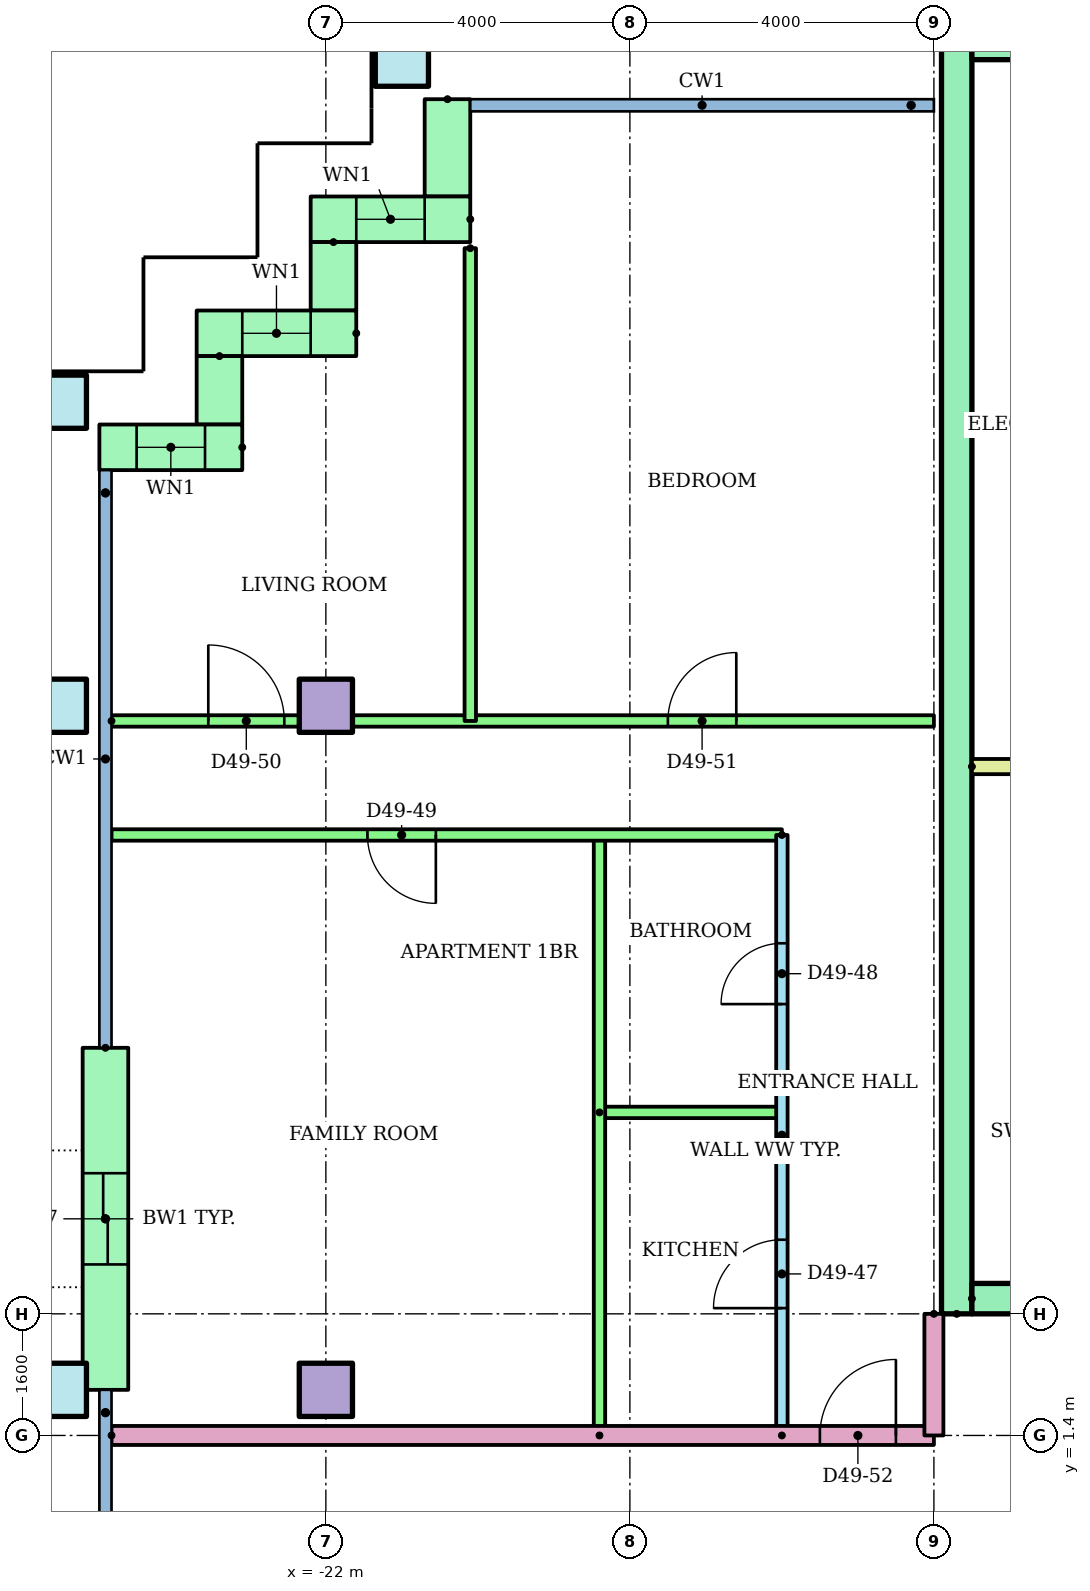
"""IFC4 building model, lengths in metres.
Left out: names, types, materials, properties, quantities, classifications, styles, units other than length and angle.
Written with IfcOpenShell. Run it as: python <this file> out.ifc"""

import sys

from ifc_helpers import new_model, si_unit, direction, frame, frame_2d, origin, origin_2d, place, context, subcontext, project, spatial, rectangle, hollow_rectangle, extrude, element, fill, save


model = new_model("IFC4")
c1 = context("Model", 3, precision=1e-05, world=origin(), true_north=direction((0.0, 1.0)))
c2 = subcontext(c1, "Body", "Model", "MODEL_VIEW")
j1 = project(units=[si_unit("LENGTHUNIT", "METRE"), si_unit("PLANEANGLEUNIT", "RADIAN")], contexts=[c1])
p1 = place(None, origin())
s1 = spatial("IfcSite", under=j1, at=p1, CompositionType="ELEMENT")
p2 = place(p1, origin())
s2 = spatial("IfcBuilding", under=s1, at=p2, CompositionType="ELEMENT")
p3 = place(p2, frame((0.0, 0.0, 187.7)))
s3 = spatial("IfcBuildingStorey", under=s2, at=p3, CompositionType="ELEMENT", Elevation=187.7)
p4 = place(p3, frame((-25.5, 2.0, 0.0)))
e1 = element("IfcColumn", 1, at=p4, inside=s3, PredefinedType="COLUMN", context=c2, shape_type="SweptSolid", body=[
    extrude(hollow_rectangle(XDim=0.7, YDim=0.7, WallThickness=0.036, at=origin_2d()), origin(), (0.0, 0.0, 1.0), 3.2),
])
p5 = place(p3, frame((-22.0, 2.0, 0.0)))
e2 = element("IfcColumn", 2, at=p5, inside=s3, PredefinedType="COLUMN", context=c2, shape_type="SweptSolid", body=[
    extrude(rectangle(XDim=0.7, YDim=0.7, at=origin_2d()), origin(), (0.0, 0.0, 1.0), 3.2),
])
p6 = place(p3, frame((-25.5, 11.0, 0.0)))
e3 = element("IfcColumn", 3, at=p6, inside=s3, PredefinedType="COLUMN", context=c2, shape_type="SweptSolid", body=[
    extrude(hollow_rectangle(XDim=0.7, YDim=0.7, WallThickness=0.036, at=origin_2d()), origin(), (0.0, 0.0, 1.0), 3.2),
])
p7 = place(p3, frame((-22.0, 11.0, 0.0)))
e4 = element("IfcColumn", 4, at=p7, inside=s3, PredefinedType="COLUMN", context=c2, shape_type="SweptSolid", body=[
    extrude(rectangle(XDim=0.7, YDim=0.7, at=origin_2d()), origin(), (0.0, 0.0, 1.0), 3.2),
])
for number, where in (
    (5, (-25.5, 15.0, 0.0)),
    (6, (-21.0, 19.5, 0.0)),
):
    element("IfcColumn", number, at=place(p3, frame(where)), inside=s3, PredefinedType="COLUMN", context=c2, shape_type="SweptSolid", body=[
        extrude(hollow_rectangle(XDim=0.7, YDim=0.7, WallThickness=0.036, at=origin_2d()), origin(), (0.0, 0.0, 1.0), 3.2),
    ])
p8 = place(p3, frame((-20.4, 18.98, 0.0), z_axis=(0.0, 0.0, 1.0), x_axis=(0.0, -1.0, 0.0)))
e7 = element("IfcWall", 7, at=p8, inside=s3, PredefinedType="STANDARD", context=c2, shape_type="SweptSolid", body=[
    extrude(rectangle(XDim=1.28, YDim=0.6, at=frame_2d((0.64, 0.0))), origin(), (0.0, 0.0, 1.0), 2.92),
])
p9 = place(p3, frame((-20.1, 17.4, 0.0), z_axis=(0.0, 0.0, 1.0), x_axis=(-1.0, 0.0, 0.0)))
e8 = element("IfcWall", 8, at=p9, inside=s3, PredefinedType="STANDARD", context=c2, shape_type="SweptSolid", body=[
    extrude(rectangle(XDim=2.1, YDim=0.6, at=frame_2d((1.05, 0.0))), origin(), (0.0, 0.0, 1.0), 2.92),
])
p10 = place(p9, frame((0.6, 0.0, 0.9)))
e9 = element("IfcOpeningElement", 9, at=p10, cuts=e8, PredefinedType="OPENING", context=c2, shape_type="SweptSolid", body=[
    extrude(rectangle(XDim=0.9, YDim=1.5, at=frame_2d((0.45, 0.75))), frame((0.0, 0.31, 0.0), z_axis=(0.0, -1.0, 0.0), x_axis=(1.0, 0.0, 0.0)), (0.0, 0.0, 1.0), 0.62),
])
p11 = place(p3, frame((-21.9, 17.1, 0.0), z_axis=(0.0, 0.0, 1.0), x_axis=(0.0, -1.0, 0.0)))
e10 = element("IfcWall", 10, at=p11, inside=s3, PredefinedType="STANDARD", context=c2, shape_type="SweptSolid", body=[
    extrude(rectangle(XDim=0.9, YDim=0.6, at=frame_2d((0.45, 0.0))), origin(), (0.0, 0.0, 1.0), 2.92),
])
p12 = place(p3, frame((-21.6, 15.9, 0.0), z_axis=(0.0, 0.0, 1.0), x_axis=(-1.0, 0.0, 0.0)))
e11 = element("IfcWall", 11, at=p12, inside=s3, PredefinedType="STANDARD", context=c2, shape_type="SweptSolid", body=[
    extrude(rectangle(XDim=2.1, YDim=0.6, at=frame_2d((1.05, 0.0))), origin(), (0.0, 0.0, 1.0), 2.92),
])
p13 = place(p12, frame((0.6, 0.0, 0.9)))
e12 = element("IfcOpeningElement", 12, at=p13, cuts=e11, PredefinedType="OPENING", context=c2, shape_type="SweptSolid", body=[
    extrude(rectangle(XDim=0.9, YDim=1.5, at=frame_2d((0.45, 0.75))), frame((0.0, 0.31, 0.0), z_axis=(0.0, -1.0, 0.0), x_axis=(1.0, 0.0, 0.0)), (0.0, 0.0, 1.0), 0.62),
])
p14 = place(p3, frame((-23.4, 15.6, 0.0), z_axis=(0.0, 0.0, 1.0), x_axis=(0.0, -1.0, 0.0)))
e13 = element("IfcWall", 13, at=p14, inside=s3, PredefinedType="STANDARD", context=c2, shape_type="SweptSolid", body=[
    extrude(rectangle(XDim=0.9, YDim=0.6, at=frame_2d((0.45, 0.0))), origin(), (0.0, 0.0, 1.0), 2.92),
])
p15 = place(p3, frame((-23.1, 14.4, 0.0), z_axis=(0.0, 0.0, 1.0), x_axis=(-1.0, 0.0, 0.0)))
e14 = element("IfcWall", 14, at=p15, inside=s3, PredefinedType="STANDARD", context=c2, shape_type="SweptSolid", body=[
    extrude(rectangle(XDim=1.88, YDim=0.6, at=frame_2d((0.94, 0.0))), origin(), (0.0, 0.0, 1.0), 2.92),
])
p16 = place(p15, frame((0.49, 0.0, 0.9)))
e15 = element("IfcOpeningElement", 15, at=p16, cuts=e14, PredefinedType="OPENING", context=c2, shape_type="SweptSolid", body=[
    extrude(rectangle(XDim=0.9, YDim=1.5, at=frame_2d((0.45, 0.75))), frame((0.0, 0.31, 0.0), z_axis=(0.0, -1.0, 0.0), x_axis=(1.0, 0.0, 0.0)), (0.0, 0.0, 1.0), 0.62),
])
p17 = place(p3, frame((-24.9, 6.5, 0.0), z_axis=(0.0, 0.0, 1.0), x_axis=(0.0, -1.0, 0.0)))
e16 = element("IfcWall", 16, at=p17, inside=s3, PredefinedType="STANDARD", context=c2, shape_type="SweptSolid", body=[
    extrude(rectangle(XDim=4.5, YDim=0.6, at=frame_2d((2.25, 0.0))), origin(), (0.0, 0.0, 1.0), 2.92),
])
p18 = place(p17, frame((1.65, 0.0, 0.0)))
e17 = element("IfcOpeningElement", 17, at=p18, cuts=e16, PredefinedType="OPENING", context=c2, shape_type="SweptSolid", body=[
    extrude(rectangle(XDim=1.2, YDim=2.1, at=frame_2d((0.6, 1.05))), frame((0.0, 0.31, 0.0), z_axis=(0.0, -1.0, 0.0), x_axis=(1.0, 0.0, 0.0)), (0.0, 0.0, 1.0), 0.62),
])
p19 = place(p3, frame((-13.7, 3.0, 0.0), z_axis=(0.0, 0.0, 1.0), x_axis=(0.0, 1.0, 0.0)))
e18 = element("IfcWall", 18, at=p19, inside=s3, PredefinedType="SHEAR", context=c2, shape_type="SweptSolid", body=[
    extrude(rectangle(XDim=17.0, YDim=0.4, at=frame_2d((8.5, 0.0))), origin(), (0.0, 0.0, 1.0), 2.92),
])
p20 = place(p3, frame((-13.5, 19.7, 0.0)))
e19 = element("IfcWall", 19, at=p20, inside=s3, PredefinedType="SHEAR", context=c2, shape_type="SweptSolid", body=[
    extrude(rectangle(XDim=27.0, YDim=0.4, at=frame_2d((13.5, 0.0))), origin(), (0.0, 0.0, 1.0), 2.92),
])
p21 = place(p3, frame((-13.5, 3.2, 0.0)))
e20 = element("IfcWall", 20, at=p21, inside=s3, PredefinedType="SHEAR", context=c2, shape_type="SweptSolid", body=[
    extrude(rectangle(XDim=27.0, YDim=0.4, at=frame_2d((13.5, 0.0))), origin(), (0.0, 0.0, 1.0), 2.92),
])
p22 = place(p21, frame((22.083, 0.0, 0.0)))
e21 = element("IfcOpeningElement", 21, at=p22, cuts=e20, PredefinedType="OPENING", context=c2, shape_type="SweptSolid", body=[
    extrude(rectangle(XDim=1.1, YDim=2.1, at=frame_2d((0.55, 1.05))), frame((0.0, 0.21, 0.0), z_axis=(0.0, -1.0, 0.0), x_axis=(1.0, 0.0, 0.0)), (0.0, 0.0, 1.0), 0.42),
])
p23 = place(p21, frame((25.128, 0.0, 0.0)))
e22 = element("IfcOpeningElement", 22, at=p23, cuts=e20, PredefinedType="OPENING", context=c2, shape_type="SweptSolid", body=[
    extrude(rectangle(XDim=1.1, YDim=2.1, at=frame_2d((0.55, 1.05))), frame((0.0, 0.21, 0.0), z_axis=(0.0, -1.0, 0.0), x_axis=(1.0, 0.0, 0.0)), (0.0, 0.0, 1.0), 0.42),
])
p24 = place(p21, frame((12.6, 0.0, 0.0)))
e23 = element("IfcOpeningElement", 23, at=p24, cuts=e20, PredefinedType="OPENING", context=c2, shape_type="SweptSolid", body=[
    extrude(rectangle(XDim=1.8, YDim=2.1, at=frame_2d((0.9, 1.05))), frame((0.0, 0.21, 0.0), z_axis=(0.0, -1.0, 0.0), x_axis=(1.0, 0.0, 0.0)), (0.0, 0.0, 1.0), 0.42),
])
p25 = place(p3, frame((-13.5, 10.2, 0.0)))
e24 = element("IfcWall", 24, at=p25, inside=s3, PredefinedType="PARTITIONING", context=c2, shape_type="SweptSolid", body=[
    extrude(rectangle(XDim=3.9, YDim=0.2, at=frame_2d((1.95, 0.0))), origin(), (0.0, 0.0, 1.0), 2.92),
])
p26 = place(p3, frame((-16.0, 1.4, 0.0), z_axis=(0.0, 0.0, 1.0), x_axis=(0.0, 1.0, 0.0)))
e25 = element("IfcWall", 25, at=p26, inside=s3, PredefinedType="PARTITIONING", context=c2, shape_type="SweptSolid", body=[
    extrude(rectangle(XDim=7.9, YDim=0.15, at=frame_2d((3.95, 0.0))), origin(), (0.0, 0.0, 1.0), 2.4),
])
p27 = place(p26, frame((1.675, 0.0, 0.0)))
e26 = element("IfcOpeningElement", 26, at=p27, cuts=e25, PredefinedType="OPENING", context=c2, shape_type="SweptSolid", body=[
    extrude(rectangle(XDim=0.9, YDim=2.1, at=frame_2d((0.45, 1.05))), frame((0.0, 0.085, 0.0), z_axis=(0.0, -1.0, 0.0), x_axis=(1.0, 0.0, 0.0)), (0.0, 0.0, 1.0), 0.17),
])
p28 = place(p26, frame((5.675, 0.0, 0.0)))
e27 = element("IfcOpeningElement", 27, at=p28, cuts=e25, PredefinedType="OPENING", context=c2, shape_type="SweptSolid", body=[
    extrude(rectangle(XDim=0.8, YDim=2.1, at=frame_2d((0.4, 1.05))), frame((0.0, 0.085, 0.0), z_axis=(0.0, -1.0, 0.0), x_axis=(1.0, 0.0, 0.0)), (0.0, 0.0, 1.0), 0.17),
])
p29 = place(p3, frame((-18.4, 5.65, 0.0)))
e28 = element("IfcWall", 28, at=p29, inside=s3, PredefinedType="PARTITIONING", context=c2, shape_type="SweptSolid", body=[
    extrude(rectangle(XDim=2.4, YDim=0.15, at=frame_2d((1.2, 0.0))), origin(), (0.0, 0.0, 1.0), 2.4),
])
p30 = place(p3, frame((-18.4, 1.4, 0.0), z_axis=(0.0, 0.0, 1.0), x_axis=(0.0, 1.0, 0.0)))
e29 = element("IfcWall", 29, at=p30, inside=s3, PredefinedType="PARTITIONING", context=c2, shape_type="SweptSolid", body=[
    extrude(rectangle(XDim=7.9, YDim=0.15, at=frame_2d((3.95, 0.0))), origin(), (0.0, 0.0, 1.0), 2.4),
])
p31 = place(p3, frame((-16.0, 9.3, 0.0), z_axis=(0.0, 0.0, 1.0), x_axis=(-1.0, 0.0, 0.0)))
e30 = element("IfcWall", 30, at=p31, inside=s3, PredefinedType="PARTITIONING", context=c2, shape_type="SweptSolid", body=[
    extrude(rectangle(XDim=8.82, YDim=0.15, at=frame_2d((4.41, 0.0))), origin(), (0.0, 0.0, 1.0), 2.4),
])
p32 = place(p31, frame((4.553, 0.0, 0.0)))
e31 = element("IfcOpeningElement", 31, at=p32, cuts=e30, PredefinedType="OPENING", context=c2, shape_type="SweptSolid", body=[
    extrude(rectangle(XDim=0.9, YDim=2.1, at=frame_2d((0.45, 1.05))), frame((0.0, 0.085, 0.0), z_axis=(0.0, -1.0, 0.0), x_axis=(1.0, 0.0, 0.0)), (0.0, 0.0, 1.0), 0.17),
])
p33 = place(p3, frame((-24.82, 10.8, 0.0)))
e32 = element("IfcWall", 32, at=p33, inside=s3, PredefinedType="PARTITIONING", context=c2, shape_type="SweptSolid", body=[
    extrude(rectangle(XDim=10.82, YDim=0.15, at=frame_2d((5.41, 0.0))), origin(), (0.0, 0.0, 1.0), 2.4),
])
p34 = place(p33, frame((1.273, 0.0, 0.0)))
e33 = element("IfcOpeningElement", 33, at=p34, cuts=e32, PredefinedType="OPENING", context=c2, shape_type="SweptSolid", body=[
    extrude(rectangle(XDim=1.0, YDim=2.1, at=frame_2d((0.5, 1.05))), frame((0.0, 0.085, 0.0), z_axis=(0.0, -1.0, 0.0), x_axis=(1.0, 0.0, 0.0)), (0.0, 0.0, 1.0), 0.17),
])
p35 = place(p33, frame((7.32, 0.0, 0.0)))
e34 = element("IfcOpeningElement", 34, at=p35, cuts=e32, PredefinedType="OPENING", context=c2, shape_type="SweptSolid", body=[
    extrude(rectangle(XDim=0.9, YDim=2.1, at=frame_2d((0.45, 1.05))), frame((0.0, 0.085, 0.0), z_axis=(0.0, -1.0, 0.0), x_axis=(1.0, 0.0, 0.0)), (0.0, 0.0, 1.0), 0.17),
])
p36 = place(p3, frame((-20.1, 17.02, 0.0), z_axis=(0.0, 0.0, 1.0), x_axis=(0.0, -1.0, 0.0)))
e35 = element("IfcWall", 35, at=p36, inside=s3, PredefinedType="PARTITIONING", context=c2, shape_type="SweptSolid", body=[
    extrude(rectangle(XDim=6.22, YDim=0.15, at=frame_2d((3.11, 0.0))), origin(), (0.0, 0.0, 1.0), 2.4),
])
p37 = place(p3, frame((-24.82, 1.4, 0.0)))
e36 = element("IfcWall", 36, at=p37, inside=s3, PredefinedType="PARTITIONING", context=c2, shape_type="SweptSolid", body=[
    extrude(rectangle(XDim=10.82, YDim=0.25, at=frame_2d((5.41, 0.0))), origin(), (0.0, 0.0, 1.0), 2.4),
])
p38 = place(p37, frame((9.32, 0.0, 0.0)))
e37 = element("IfcOpeningElement", 37, at=p38, cuts=e36, PredefinedType="OPENING", context=c2, shape_type="SweptSolid", body=[
    extrude(rectangle(XDim=1.0, YDim=2.1, at=frame_2d((0.5, 1.05))), frame((0.0, 0.135, 0.0), z_axis=(0.0, -1.0, 0.0), x_axis=(1.0, 0.0, 0.0)), (0.0, 0.0, 1.0), 0.27),
])
p39 = place(p3, frame((-14.0, 3.0, 0.0), z_axis=(0.0, 0.0, 1.0), x_axis=(0.0, -1.0, 0.0)))
e38 = element("IfcWall", 38, at=p39, inside=s3, PredefinedType="PARTITIONING", context=c2, shape_type="SweptSolid", body=[
    extrude(rectangle(XDim=1.6, YDim=0.25, at=frame_2d((0.8, 0.0))), origin(), (0.0, 0.0, 1.0), 2.4),
])
p40 = place(p10, origin())
e39 = element("IfcWindow", 39, at=p40, inside=s3, PartitioningType="SINGLE_PANEL", PredefinedType="WINDOW", context=c2, shape_type="SweptSolid", body=[
    extrude(rectangle(XDim=0.9, YDim=1.5, at=frame_2d((0.45, 0.75))), frame((0.0, 0.03, 0.0), z_axis=(0.0, -1.0, 0.0), x_axis=(1.0, 0.0, 0.0)), (0.0, 0.0, 1.0), 0.06),
])
fill(e9, e39)
p41 = place(p13, origin())
e40 = element("IfcWindow", 40, at=p41, inside=s3, PartitioningType="SINGLE_PANEL", PredefinedType="WINDOW", context=c2, shape_type="SweptSolid", body=[
    extrude(rectangle(XDim=0.9, YDim=1.5, at=frame_2d((0.45, 0.75))), frame((0.0, 0.03, 0.0), z_axis=(0.0, -1.0, 0.0), x_axis=(1.0, 0.0, 0.0)), (0.0, 0.0, 1.0), 0.06),
])
fill(e12, e40)
p42 = place(p16, origin())
e41 = element("IfcWindow", 41, at=p42, inside=s3, PartitioningType="SINGLE_PANEL", PredefinedType="WINDOW", context=c2, shape_type="SweptSolid", body=[
    extrude(rectangle(XDim=0.9, YDim=1.5, at=frame_2d((0.45, 0.75))), frame((0.0, 0.03, 0.0), z_axis=(0.0, -1.0, 0.0), x_axis=(1.0, 0.0, 0.0)), (0.0, 0.0, 1.0), 0.06),
])
fill(e15, e41)
p43 = place(p27, origin())
e42 = element("IfcDoor", 42, at=p43, inside=s3, OperationType="SINGLE_SWING_LEFT", PredefinedType="DOOR", context=c2, shape_type="SweptSolid", body=[
    extrude(rectangle(XDim=0.9, YDim=2.1, at=frame_2d((0.45, 1.05))), frame((0.0, 0.025, 0.0), z_axis=(0.0, -1.0, 0.0), x_axis=(1.0, 0.0, 0.0)), (0.0, 0.0, 1.0), 0.05),
])
fill(e26, e42)
p44 = place(p28, origin())
e43 = element("IfcDoor", 43, at=p44, inside=s3, OperationType="SINGLE_SWING_LEFT", PredefinedType="DOOR", context=c2, shape_type="SweptSolid", body=[
    extrude(rectangle(XDim=0.8, YDim=2.1, at=frame_2d((0.4, 1.05))), frame((0.0, 0.025, 0.0), z_axis=(0.0, -1.0, 0.0), x_axis=(1.0, 0.0, 0.0)), (0.0, 0.0, 1.0), 0.05),
])
fill(e27, e43)
p45 = place(p32, origin())
e44 = element("IfcDoor", 44, at=p45, inside=s3, OperationType="SINGLE_SWING_LEFT", PredefinedType="DOOR", context=c2, shape_type="SweptSolid", body=[
    extrude(rectangle(XDim=0.9, YDim=2.1, at=frame_2d((0.45, 1.05))), frame((0.0, 0.025, 0.0), z_axis=(0.0, -1.0, 0.0), x_axis=(1.0, 0.0, 0.0)), (0.0, 0.0, 1.0), 0.05),
])
fill(e31, e44)
p46 = place(p34, origin())
e45 = element("IfcDoor", 45, at=p46, inside=s3, OperationType="SINGLE_SWING_LEFT", PredefinedType="DOOR", context=c2, shape_type="SweptSolid", body=[
    extrude(rectangle(XDim=1.0, YDim=2.1, at=frame_2d((0.5, 1.05))), frame((0.0, 0.025, 0.0), z_axis=(0.0, -1.0, 0.0), x_axis=(1.0, 0.0, 0.0)), (0.0, 0.0, 1.0), 0.05),
])
fill(e33, e45)
p47 = place(p35, origin())
e46 = element("IfcDoor", 46, at=p47, inside=s3, OperationType="SINGLE_SWING_RIGHT", PredefinedType="DOOR", context=c2, shape_type="SweptSolid", body=[
    extrude(rectangle(XDim=0.9, YDim=2.1, at=frame_2d((0.45, 1.05))), frame((0.0, 0.025, 0.0), z_axis=(0.0, -1.0, 0.0), x_axis=(1.0, 0.0, 0.0)), (0.0, 0.0, 1.0), 0.05),
])
fill(e34, e46)
p48 = place(p38, origin())
e47 = element("IfcDoor", 47, at=p48, inside=s3, OperationType="SINGLE_SWING_RIGHT", PredefinedType="DOOR", context=c2, shape_type="SweptSolid", body=[
    extrude(rectangle(XDim=1.0, YDim=2.1, at=frame_2d((0.5, 1.05))), frame((0.0, 0.025, 0.0), z_axis=(0.0, -1.0, 0.0), x_axis=(1.0, 0.0, 0.0)), (0.0, 0.0, 1.0), 0.05),
])
fill(e37, e47)
p49 = place(p18, origin())
e48 = element("IfcDoor", 48, at=p49, inside=s3, OperationType="SLIDING_TO_LEFT", PredefinedType="DOOR", context=c2, shape_type="SweptSolid", body=[
    extrude(rectangle(XDim=1.2, YDim=2.1, at=frame_2d((0.6, 1.05))), frame((0.0, 0.025, 0.0), z_axis=(0.0, -1.0, 0.0), x_axis=(1.0, 0.0, 0.0)), (0.0, 0.0, 1.0), 0.05),
])
fill(e17, e48)
save(model, sys.argv[1])
